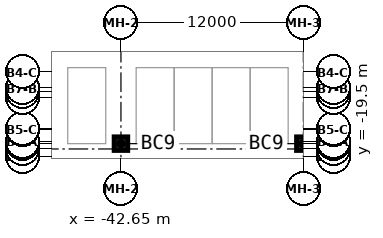
"""IFC4 building model, lengths in metres.
Left out: names, types, materials, properties, quantities, classifications, styles, units other than length and angle.
Written with IfcOpenShell. Run it as: python <this file> out.ifc"""

import sys

from ifc_helpers import new_model, si_unit, direction, frame, origin, origin_2d, place, context, subcontext, project, spatial, rectangle, extrude, source, transform, mapped, element, save


model = new_model("IFC4")
c1 = context("Model", 3, precision=1e-05, world=origin(), true_north=direction((0.0, 1.0)))
c2 = subcontext(c1, "Body", "Model", "MODEL_VIEW")
j1 = project(units=[si_unit("LENGTHUNIT", "METRE"), si_unit("PLANEANGLEUNIT", "RADIAN")], contexts=[c1])
p1 = place(None, origin())
s1 = spatial("IfcSite", under=j1, at=p1, CompositionType="ELEMENT")
p2 = place(p1, origin())
s2 = spatial("IfcBuilding", under=s1, at=p2, CompositionType="ELEMENT")
p3 = place(p2, frame((0.0, 0.0, -4.5)))
s3 = spatial("IfcBuildingStorey", under=s2, at=p3, CompositionType="ELEMENT", Elevation=-4.5)
m1 = source(origin(), c2, "Body", "SweptSolid", [
    extrude(rectangle(XDim=0.9, YDim=0.9, at=origin_2d()), origin(), (0.0, 0.0, 1.0), 4.5),
])
for number, where, z_axis, x_axis in (
    (1, (-42.65, -18.65, 0.0), (0.0, 0.0, 1.0), (1.0, 0.0, 0.0)),
    (2, (-30.65, -18.65, 0.0), (0.0, 0.0, 1.0), (1.0, 0.0, 0.0)),
):
    element("IfcColumn", number, at=place(p3, frame(where, z_axis=z_axis, x_axis=x_axis)), inside=s3, PredefinedType="COLUMN", context=c2, shape_type="MappedRepresentation", body=[
        mapped(m1, transform((0.0, 0.0, 0.0))),
    ])
save(model, sys.argv[1])
